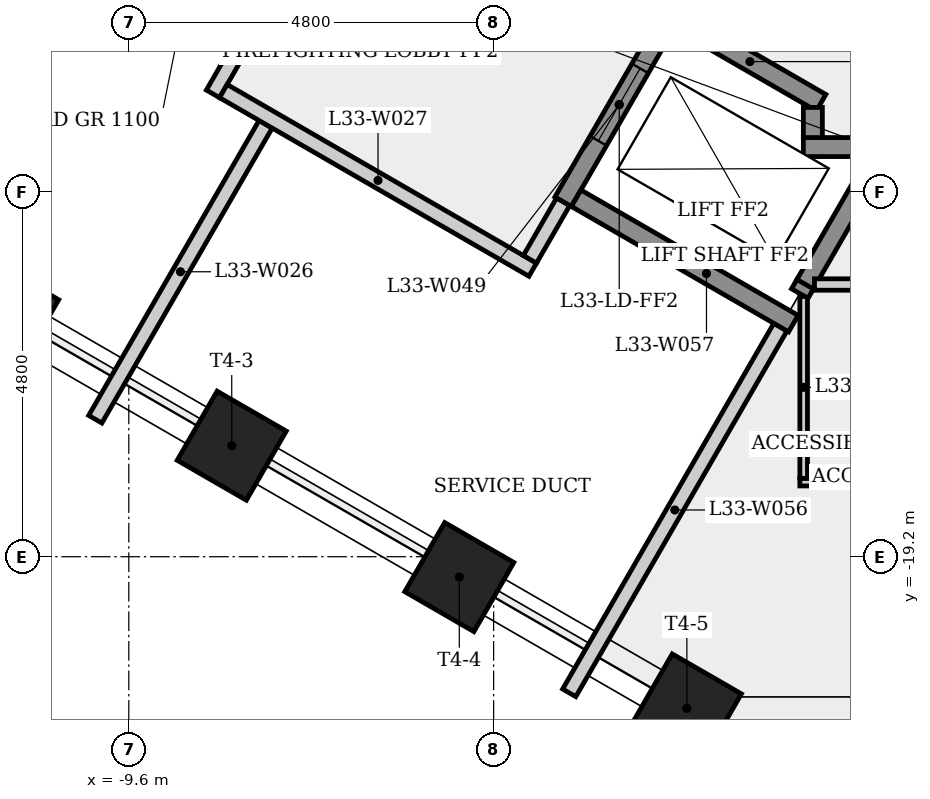
"""IFC4 building model, lengths in metres.
Left out: names, types, materials, properties, quantities, classifications, styles, units other than length and angle.
Written with IfcOpenShell. Run it as: python <this file> out.ifc"""

import sys

from ifc_helpers import new_model, si_unit, direction, frame, frame_2d, origin, origin_2d, place, context, subcontext, project, spatial, rectangle, extrude, element, fill, save


model = new_model("IFC4")
c1 = context("Model", 3, precision=1e-05, world=origin(), true_north=direction((0.0, 1.0)))
c2 = subcontext(c1, "Body", "Model", "MODEL_VIEW")
j1 = project(units=[si_unit("LENGTHUNIT", "METRE"), si_unit("PLANEANGLEUNIT", "RADIAN")], contexts=[c1])
p1 = place(None, origin())
s1 = spatial("IfcSite", under=j1, at=p1, CompositionType="ELEMENT")
p2 = place(p1, origin())
s2 = spatial("IfcBuilding", under=s1, at=p2, CompositionType="ELEMENT")
p3 = place(p2, frame((0.0, 0.0, 124.5)))
s3 = spatial("IfcBuildingStorey", under=s2, at=p3, CompositionType="ELEMENT", Elevation=124.5)
for number, where, z_axis, x_axis in (
    (1, (-11.24, -16.011, 0.0), (0.0, 0.0, 1.0), (-0.5, -0.866, 0.0)),
    (2, (-8.246, -17.739, 0.0), (0.0, 0.0, 1.0), (-0.5, -0.866, 0.0)),
    (3, (-5.252, -19.468, 0.0), (0.0, 0.0, 1.0), (-0.5, -0.866, 0.0)),
    (4, (-2.258, -21.197, 0.0), (0.0, 0.0, 1.0), (-0.5, -0.866, 0.0)),
):
    element("IfcColumn", number, at=place(p3, frame(where, z_axis=z_axis, x_axis=x_axis)), inside=s3, PredefinedType="COLUMN", context=c2, shape_type="SweptSolid", body=[
        extrude(rectangle(XDim=1.05, YDim=1.05, at=origin_2d()), origin(), (0.0, 0.0, 1.0), 4.0),
    ])
p4 = place(p3, frame((-8.493, -13.11, 0.0), z_axis=(0.0, 0.0, 1.0), x_axis=(0.500067724834, 0.865986299303, 0.0)))
e5 = element("IfcWall", 5, at=p4, inside=s3, PredefinedType="PLUMBINGWALL", context=c2, shape_type="SweptSolid", body=[
    extrude(rectangle(XDim=0.775, YDim=0.2, at=frame_2d((0.388, 0.0))), origin(), (0.0, 0.0, 1.0), 3.6),
])
p5 = place(p3, frame((-7.8, -13.51, 0.0), z_axis=(0.0, 0.0, 1.0), x_axis=(-0.499994393058, -0.866028640929, 0.0)))
e6 = element("IfcWall", 6, at=p5, inside=s3, PredefinedType="PLUMBINGWALL", context=c2, shape_type="SweptSolid", body=[
    extrude(rectangle(XDim=4.481, YDim=0.2, at=frame_2d((2.241, 0.0))), origin(), (0.0, 0.0, 1.0), 3.6),
])
p6 = place(p3, frame((-8.356, -13.073, 0.0), z_axis=(0.0, 0.0, 1.0), x_axis=(0.866038532462, -0.499977259774, 0.0)))
e7 = element("IfcWall", 7, at=p6, inside=s3, PredefinedType="PLUMBINGWALL", context=c2, shape_type="SweptSolid", body=[
    extrude(rectangle(XDim=4.7, YDim=0.2, at=frame_2d((2.35, 0.0))), origin(), (0.0, 0.0, 1.0), 3.6),
])
p7 = place(p3, frame((-3.885, -14.529, 0.0), z_axis=(0.0, 0.0, 1.0), x_axis=(-0.499859285417, -0.866106630146, 0.0)))
e8 = element("IfcWall", 8, at=p7, inside=s3, PredefinedType="PLUMBINGWALL", context=c2, shape_type="SweptSolid", body=[
    extrude(rectangle(XDim=0.875, YDim=0.2, at=frame_2d((0.438, 0.0))), origin(), (0.0, 0.0, 1.0), 3.6),
])
p8 = place(p3, frame((-2.41, -11.974, 0.0), z_axis=(0.0, 0.0, 1.0), x_axis=(-0.500001826776, -0.866024349092, 0.0)))
e9 = element("IfcWall", 9, at=p8, inside=s3, PredefinedType="SHEAR", context=c2, shape_type="SweptSolid", body=[
    extrude(rectangle(XDim=2.95, YDim=0.25, at=frame_2d((1.475, 0.0))), origin(), (0.0, 0.0, 1.0), 3.6),
])
p9 = place(p8, frame((0.925, 0.0, 0.0)))
e10 = element("IfcOpeningElement", 10, at=p9, cuts=e9, PredefinedType="OPENING", context=c2, shape_type="SweptSolid", body=[
    extrude(rectangle(XDim=1.1, YDim=2.1, at=frame_2d((0.55, 1.05))), frame((0.0, 0.135, 0.0), z_axis=(0.0, -1.0, 0.0), x_axis=(1.0, 0.0, 0.0)), (0.0, 0.0, 1.0), 0.27),
])
p10 = place(p3, frame((-2.364, -12.145, 0.0), z_axis=(0.0, 0.0, 1.0), x_axis=(0.86603892542, -0.499976579108, 0.0)))
e11 = element("IfcWall", 11, at=p10, inside=s3, PredefinedType="SHEAR", context=c2, shape_type="SweptSolid", body=[
    extrude(rectangle(XDim=2.162, YDim=0.25, at=frame_2d((1.081, 0.0))), origin(), (0.0, 0.0, 1.0), 3.6),
])
p11 = place(p3, frame((-1.027, -16.179, 0.0), z_axis=(0.0, 0.0, 1.0), x_axis=(-0.499995019066, -0.866028279509, 0.0)))
e12 = element("IfcWall", 12, at=p11, inside=s3, PredefinedType="PLUMBINGWALL", context=c2, shape_type="SweptSolid", body=[
    extrude(rectangle(XDim=5.557, YDim=0.2, at=frame_2d((2.778, 0.0))), origin(), (0.0, 0.0, 1.0), 3.6),
])
p12 = place(p3, frame((-0.856, -16.133, 0.0), z_axis=(0.0, 0.0, 1.0), x_axis=(-0.866021716278, 0.500006386895, 0.0)))
e13 = element("IfcWall", 13, at=p12, inside=s3, PredefinedType="SHEAR", context=c2, shape_type="SweptSolid", body=[
    extrude(rectangle(XDim=3.3, YDim=0.25, at=frame_2d((1.65, 0.0))), origin(), (0.0, 0.0, 1.0), 3.6),
])
p13 = place(p3, frame((-0.771, -18.219, 0.0), z_axis=(0.0, 0.0, 1.0), x_axis=(1.0, 0.0, 0.0)))
e14 = element("IfcWall", 14, at=p13, inside=s3, PredefinedType="PARTITIONING", context=c2, shape_type="SweptSolid", body=[
    extrude(rectangle(XDim=2.613, YDim=0.1, at=frame_2d((1.307, 0.0))), origin(), (0.0, 0.0, 1.0), 3.6),
])
p14 = place(p3, frame((-0.721, -15.774, 0.0), z_axis=(0.0, 0.0, 1.0), x_axis=(0.0, -1.0, 0.0)))
e15 = element("IfcWall", 15, at=p14, inside=s3, PredefinedType="PARTITIONING", context=c2, shape_type="SweptSolid", body=[
    extrude(rectangle(XDim=2.395, YDim=0.1, at=frame_2d((1.198, 0.0))), origin(), (0.0, 0.0, 1.0), 3.6),
])
p15 = place(p3, frame((-0.696, -15.605, 0.0), z_axis=(0.0, 0.0, 1.0), x_axis=(-0.500783975169, -0.865572302129, 0.0)))
e16 = element("IfcWall", 16, at=p15, inside=s3, PredefinedType="SHEAR", context=c2, shape_type="SweptSolid", body=[
    extrude(rectangle(XDim=0.153, YDim=0.25, at=frame_2d((0.076, 0.0))), origin(), (0.0, 0.0, 1.0), 4.0),
])
p16 = place(p3, frame((-0.725, -13.81, 0.0), z_axis=(0.0, 0.0, 1.0), x_axis=(1.0, 0.0, 0.0)))
e17 = element("IfcWall", 17, at=p16, inside=s3, PredefinedType="SHEAR", context=c2, shape_type="SweptSolid", body=[
    extrude(rectangle(XDim=1.191, YDim=0.25, at=frame_2d((0.595, 0.0))), origin(), (0.0, 0.0, 1.0), 3.6),
])
p17 = place(p3, frame((-0.6, -13.289, 0.0), z_axis=(0.0, 0.0, 1.0), x_axis=(0.0, -1.0, 0.0)))
e18 = element("IfcWall", 18, at=p17, inside=s3, PredefinedType="SHEAR", context=c2, shape_type="SweptSolid", body=[
    extrude(rectangle(XDim=0.396, YDim=0.25, at=frame_2d((0.198, 0.0))), origin(), (0.0, 0.0, 1.0), 4.0),
])
p18 = place(p3, frame((0.278, -13.918, 0.0), z_axis=(0.0, 0.0, 1.0), x_axis=(-0.499959831567, -0.866048593798, 0.0)))
e19 = element("IfcWall", 19, at=p18, inside=s3, PredefinedType="SHEAR", context=c2, shape_type="SweptSolid", body=[
    extrude(rectangle(XDim=1.959, YDim=0.25, at=frame_2d((0.979, 0.0))), origin(), (0.0, 0.0, 1.0), 4.0),
])
p19 = place(p3, frame((-0.579, -15.619, 0.0), z_axis=(0.0, 0.0, 1.0), x_axis=(1.0, 0.0, 0.0)))
e20 = element("IfcWall", 20, at=p19, inside=s3, PredefinedType="PARTITIONING", context=c2, shape_type="SweptSolid", body=[
    extrude(rectangle(XDim=3.954, YDim=0.15, at=frame_2d((1.977, 0.0))), origin(), (0.0, 0.0, 1.0), 3.6),
])
p20 = place(p19, frame((2.727, 0.0, 0.0)))
e21 = element("IfcOpeningElement", 21, at=p20, cuts=e20, PredefinedType="OPENING", context=c2, shape_type="SweptSolid", body=[
    extrude(rectangle(XDim=0.9, YDim=2.1, at=frame_2d((0.45, 1.05))), frame((0.0, 0.085, 0.0), z_axis=(0.0, -1.0, 0.0), x_axis=(1.0, 0.0, 0.0)), (0.0, 0.0, 1.0), 0.17),
])
p21 = place(p9, origin())
e22 = element("IfcDoor", 22, at=p21, inside=s3, OperationType="SLIDING_TO_LEFT", PredefinedType="DOOR", context=c2, shape_type="SweptSolid", body=[
    extrude(rectangle(XDim=1.1, YDim=2.1, at=frame_2d((0.55, 1.05))), frame((0.0, 0.025, 0.0), z_axis=(0.0, -1.0, 0.0), x_axis=(1.0, 0.0, 0.0)), (0.0, 0.0, 1.0), 0.05),
])
fill(e10, e22)
save(model, sys.argv[1])
